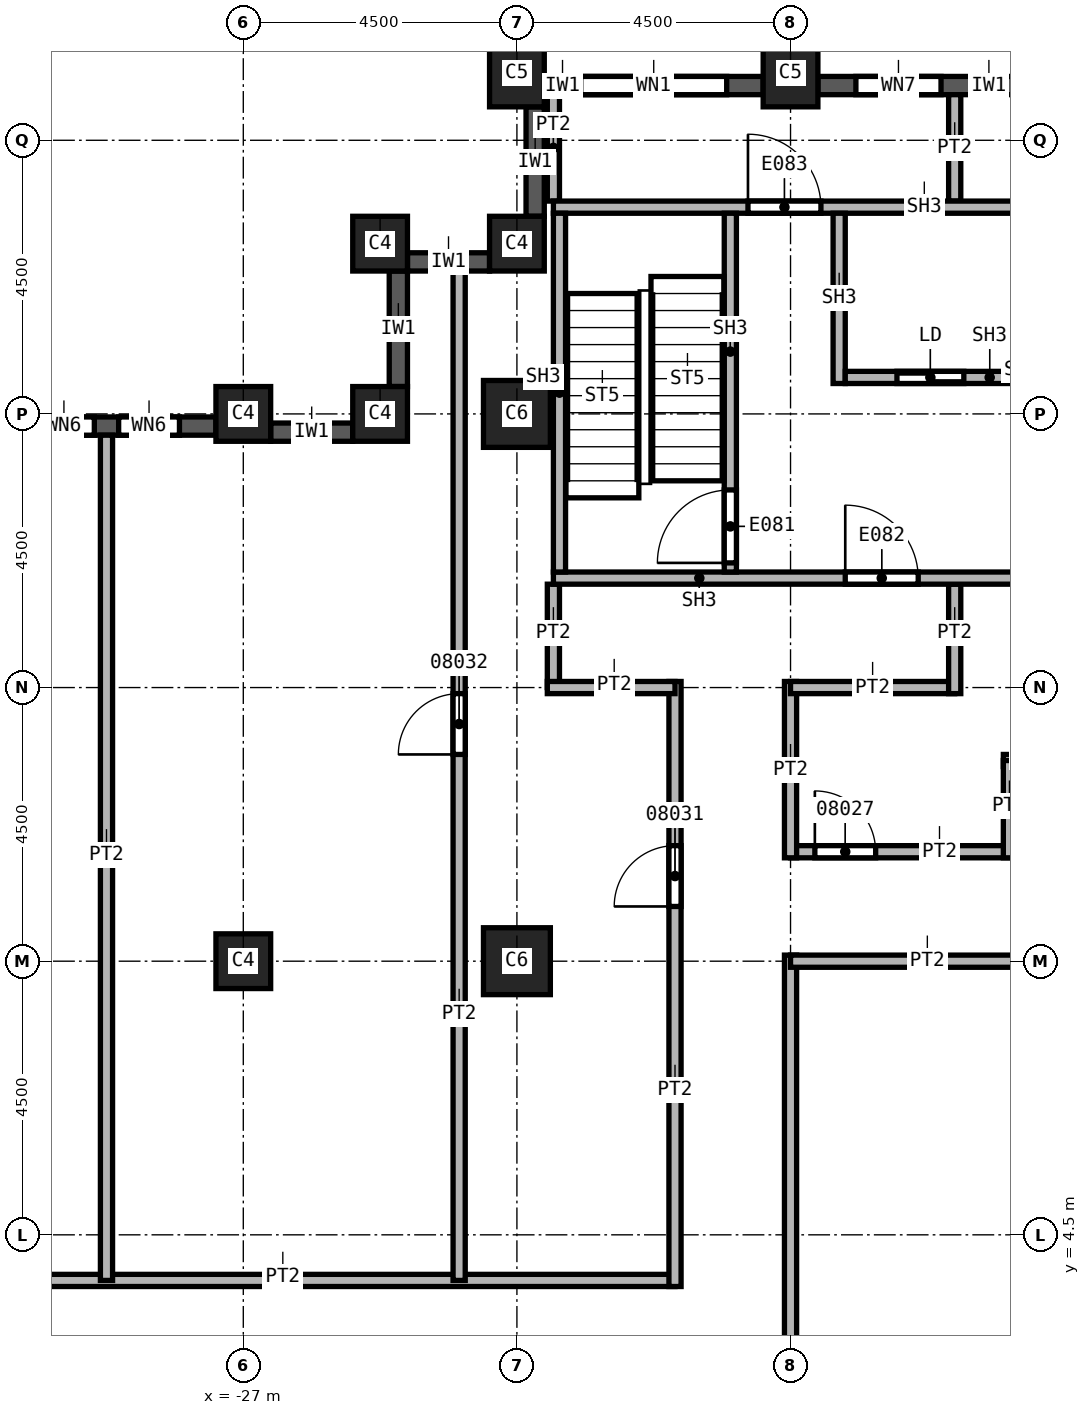
"""IFC4 building model, lengths in metres.
Left out: names, types, materials, properties, quantities, classifications, styles, units other than length and angle.
Written with IfcOpenShell. Run it as: python <this file> out.ifc"""

import sys

from ifc_helpers import new_model, si_unit, direction, frame, frame_2d, origin, origin_2d, place, context, subcontext, project, spatial, rectangle, extrude, element, fill, save


model = new_model("IFC4")
c1 = context("Model", 3, precision=1e-05, world=origin(), true_north=direction((0.0, 1.0)))
c2 = subcontext(c1, "Body", "Model", "MODEL_VIEW")
j1 = project(units=[si_unit("LENGTHUNIT", "METRE"), si_unit("PLANEANGLEUNIT", "RADIAN")], contexts=[c1])
p1 = place(None, origin())
s1 = spatial("IfcSite", under=j1, at=p1, CompositionType="ELEMENT")
p2 = place(p1, origin())
s2 = spatial("IfcBuilding", under=s1, at=p2, CompositionType="ELEMENT")
p3 = place(p2, frame((0.0, 0.0, 150.0)))
s3 = spatial("IfcBuildingStorey", under=s2, at=p3, CompositionType="ELEMENT", Elevation=150.0)
for number, where, z_axis, x_axis in (
    (1, (-22.5, 9.0, 0.0), (0.0, 0.0, 1.0), (1.0, 0.0, 0.0)),
    (2, (-22.5, 18.0, 0.0), (0.0, 0.0, 1.0), (1.0, 0.0, 0.0)),
):
    element("IfcColumn", number, at=place(p3, frame(where, z_axis=z_axis, x_axis=x_axis)), inside=s3, PredefinedType="COLUMN", context=c2, shape_type="SweptSolid", body=[
        extrude(rectangle(XDim=1.1, YDim=1.1, at=origin_2d()), origin(), (0.0, 0.0, 1.0), 3.7),
    ])
for number, where, z_axis, x_axis in (
    (3, (-18.0, 23.6, 0.0), (0.0, 0.0, 1.0), (1.0, 0.0, 0.0)),
    (4, (-22.5, 23.6, 0.0), (0.0, 0.0, 1.0), (1.0, 0.0, 0.0)),
):
    element("IfcColumn", number, at=place(p3, frame(where, z_axis=z_axis, x_axis=x_axis)), inside=s3, PredefinedType="COLUMN", context=c2, shape_type="SweptSolid", body=[
        extrude(rectangle(XDim=0.9, YDim=1.1, at=origin_2d()), origin(), (0.0, 0.0, 1.0), 3.7),
    ])
for number, where, z_axis, x_axis in (
    (5, (-27.0, 9.0, 0.0), (0.0, 0.0, 1.0), (1.0, 0.0, 0.0)),
    (6, (-27.0, 18.0, 0.0), (0.0, 0.0, 1.0), (1.0, 0.0, 0.0)),
    (7, (-22.5, 20.8, 0.0), (0.0, 0.0, 1.0), (1.0, 0.0, 0.0)),
    (8, (-24.75, 20.8, 0.0), (0.0, 0.0, 1.0), (1.0, 0.0, 0.0)),
    (9, (-24.75, 18.0, 0.0), (0.0, 0.0, 1.0), (1.0, 0.0, 0.0)),
):
    element("IfcColumn", number, at=place(p3, frame(where, z_axis=z_axis, x_axis=x_axis)), inside=s3, PredefinedType="COLUMN", context=c2, shape_type="SweptSolid", body=[
        extrude(rectangle(XDim=0.9, YDim=0.9, at=origin_2d()), origin(), (0.0, 0.0, 1.0), 3.7),
    ])
p4 = place(p3, frame((-22.2, 23.05, 0.0), z_axis=(0.0, 0.0, 1.0), x_axis=(0.0, -1.0, 0.0)))
e10 = element("IfcWall", 10, at=p4, inside=s3, PredefinedType="SOLIDWALL", context=c2, shape_type="SweptSolid", body=[
    extrude(rectangle(XDim=1.8, YDim=0.3, at=frame_2d((0.9, 0.0))), origin(), (0.0, 0.0, 1.0), 3.1),
])
p5 = place(p3, frame((-22.95, 20.5, 0.0), z_axis=(0.0, 0.0, 1.0), x_axis=(-1.0, 0.0, 0.0)))
e11 = element("IfcWall", 11, at=p5, inside=s3, PredefinedType="SOLIDWALL", context=c2, shape_type="SweptSolid", body=[
    extrude(rectangle(XDim=1.35, YDim=0.3, at=frame_2d((0.675, 0.0))), origin(), (0.0, 0.0, 1.0), 3.1),
])
p6 = place(p3, frame((-24.45, 20.35, 0.0), z_axis=(0.0, 0.0, 1.0), x_axis=(0.0, -1.0, 0.0)))
e12 = element("IfcWall", 12, at=p6, inside=s3, PredefinedType="SOLIDWALL", context=c2, shape_type="SweptSolid", body=[
    extrude(rectangle(XDim=1.9, YDim=0.3, at=frame_2d((0.95, 0.0))), origin(), (0.0, 0.0, 1.0), 3.1),
])
p7 = place(p3, frame((-25.2, 17.7, 0.0), z_axis=(0.0, 0.0, 1.0), x_axis=(-1.0, 0.0, 0.0)))
e13 = element("IfcWall", 13, at=p7, inside=s3, PredefinedType="SOLIDWALL", context=c2, shape_type="SweptSolid", body=[
    extrude(rectangle(XDim=1.35, YDim=0.3, at=frame_2d((0.675, 0.0))), origin(), (0.0, 0.0, 1.0), 3.1),
])
p8 = place(p3, frame((-27.45, 17.8, 0.0), z_axis=(0.0, 0.0, 1.0), x_axis=(-1.0, 0.0, 0.0)))
e14 = element("IfcWall", 14, at=p8, inside=s3, PredefinedType="SOLIDWALL", context=c2, shape_type="SweptSolid", body=[
    extrude(rectangle(XDim=3.6, YDim=0.3, at=frame_2d((1.8, 0.0))), origin(), (0.0, 0.0, 1.0), 3.1),
])
p9 = place(p8, frame((0.6, 0.0, 0.8)))
e15 = element("IfcOpeningElement", 15, at=p9, cuts=e14, PredefinedType="OPENING", context=c2, shape_type="SweptSolid", body=[
    extrude(rectangle(XDim=1.0, YDim=1.95, at=frame_2d((0.5, 0.975))), frame((0.0, 0.15, 0.0), z_axis=(0.0, -1.0, 0.0), x_axis=(1.0, 0.0, 0.0)), (0.0, 0.0, 1.0), 0.3),
])
p10 = place(p8, frame((2.0, 0.0, 0.8)))
e16 = element("IfcOpeningElement", 16, at=p10, cuts=e14, PredefinedType="OPENING", context=c2, shape_type="SweptSolid", body=[
    extrude(rectangle(XDim=1.0, YDim=1.95, at=frame_2d((0.5, 0.975))), frame((0.0, 0.15, 0.0), z_axis=(0.0, -1.0, 0.0), x_axis=(1.0, 0.0, 0.0)), (0.0, 0.0, 1.0), 0.3),
])
p11 = place(p3, frame((-13.95, 23.4, 0.0), z_axis=(0.0, 0.0, 1.0), x_axis=(-1.0, 0.0, 0.0)))
e17 = element("IfcWall", 17, at=p11, inside=s3, PredefinedType="SOLIDWALL", context=c2, shape_type="SweptSolid", body=[
    extrude(rectangle(XDim=3.6, YDim=0.3, at=frame_2d((1.8, 0.0))), origin(), (0.0, 0.0, 1.0), 3.1),
])
p12 = place(p11, frame((1.575, 0.0, 0.8)))
e18 = element("IfcOpeningElement", 18, at=p12, cuts=e17, PredefinedType="OPENING", context=c2, shape_type="SweptSolid", body=[
    extrude(rectangle(XDim=1.4, YDim=1.95, at=frame_2d((0.7, 0.975))), frame((0.0, 0.15, 0.0), z_axis=(0.0, -1.0, 0.0), x_axis=(1.0, 0.0, 0.0)), (0.0, 0.0, 1.0), 0.3),
])
p13 = place(p3, frame((-18.45, 23.4, 0.0), z_axis=(0.0, 0.0, 1.0), x_axis=(-1.0, 0.0, 0.0)))
e19 = element("IfcWall", 19, at=p13, inside=s3, PredefinedType="SOLIDWALL", context=c2, shape_type="SweptSolid", body=[
    extrude(rectangle(XDim=3.6, YDim=0.3, at=frame_2d((1.8, 0.0))), origin(), (0.0, 0.0, 1.0), 3.1),
])
p14 = place(p13, frame((0.6, 0.0, 0.8)))
e20 = element("IfcOpeningElement", 20, at=p14, cuts=e19, PredefinedType="OPENING", context=c2, shape_type="SweptSolid", body=[
    extrude(rectangle(XDim=2.4, YDim=1.95, at=frame_2d((1.2, 0.975))), frame((0.0, 0.15, 0.0), z_axis=(0.0, -1.0, 0.0), x_axis=(1.0, 0.0, 0.0)), (0.0, 0.0, 1.0), 0.3),
])
p15 = place(p3, frame((-33.85, 3.75, 0.0), z_axis=(0.0, 0.0, 1.0), x_axis=(1.0, 0.0, 0.0)))
e21 = element("IfcWall", 21, at=p15, inside=s3, PredefinedType="PARTITIONING", context=c2, shape_type="SweptSolid", body=[
    extrude(rectangle(XDim=13.95, YDim=0.2, at=frame_2d((6.975, 0.0))), origin(), (0.0, 0.0, 1.0), 3.7),
])
p16 = place(p3, frame((-29.25, 3.75, 0.0), z_axis=(0.0, 0.0, 1.0), x_axis=(0.0, 1.0, 0.0)))
e22 = element("IfcWall", 22, at=p16, inside=s3, PredefinedType="PARTITIONING", context=c2, shape_type="SweptSolid", body=[
    extrude(rectangle(XDim=13.9, YDim=0.2, at=frame_2d((6.95, 0.0))), origin(), (0.0, 0.0, 1.0), 3.7),
])
p17 = place(p3, frame((-23.45, 3.75, 0.0), z_axis=(0.0, 0.0, 1.0), x_axis=(0.0, 1.0, 0.0)))
e23 = element("IfcWall", 23, at=p17, inside=s3, PredefinedType="PARTITIONING", context=c2, shape_type="SweptSolid", body=[
    extrude(rectangle(XDim=16.6, YDim=0.2, at=frame_2d((8.3, 0.0))), origin(), (0.0, 0.0, 1.0), 3.7),
])
p18 = place(p17, frame((8.65, 0.0, 0.0)))
e24 = element("IfcOpeningElement", 24, at=p18, cuts=e23, PredefinedType="OPENING", context=c2, shape_type="SweptSolid", body=[
    extrude(rectangle(XDim=1.0, YDim=2.1, at=frame_2d((0.5, 1.05))), frame((0.0, 0.1, 0.0), z_axis=(0.0, -1.0, 0.0), x_axis=(1.0, 0.0, 0.0)), (0.0, 0.0, 1.0), 0.2),
])
p19 = place(p3, frame((-21.9, 13.5, 0.0), z_axis=(0.0, 0.0, 1.0), x_axis=(0.0, 1.0, 0.0)))
e25 = element("IfcWall", 25, at=p19, inside=s3, PredefinedType="PARTITIONING", context=c2, shape_type="SweptSolid", body=[
    extrude(rectangle(XDim=1.7, YDim=0.2, at=frame_2d((0.85, 0.0))), origin(), (0.0, 0.0, 1.0), 3.7),
])
p20 = place(p3, frame((-21.9, 21.5, 0.0), z_axis=(0.0, 0.0, 1.0), x_axis=(0.0, 1.0, 0.0)))
e26 = element("IfcWall", 26, at=p20, inside=s3, PredefinedType="PARTITIONING", context=c2, shape_type="SweptSolid", body=[
    extrude(rectangle(XDim=1.75, YDim=0.2, at=frame_2d((0.875, 0.0))), origin(), (0.0, 0.0, 1.0), 3.7),
])
p21 = place(p3, frame((-19.9, 3.65, 0.0), z_axis=(0.0, 0.0, 1.0), x_axis=(0.0, 1.0, 0.0)))
e27 = element("IfcWall", 27, at=p21, inside=s3, PredefinedType="PARTITIONING", context=c2, shape_type="SweptSolid", body=[
    extrude(rectangle(XDim=9.95, YDim=0.2, at=frame_2d((4.975, 0.0))), origin(), (0.0, 0.0, 1.0), 3.7),
])
p22 = place(p21, frame((6.25, 0.0, 0.0)))
e28 = element("IfcOpeningElement", 28, at=p22, cuts=e27, PredefinedType="OPENING", context=c2, shape_type="SweptSolid", body=[
    extrude(rectangle(XDim=1.0, YDim=2.1, at=frame_2d((0.5, 1.05))), frame((0.0, 0.1, 0.0), z_axis=(0.0, -1.0, 0.0), x_axis=(1.0, 0.0, 0.0)), (0.0, 0.0, 1.0), 0.2),
])
p23 = place(p3, frame((-19.9, 13.5, 0.0), z_axis=(0.0, 0.0, 1.0), x_axis=(-1.0, 0.0, 0.0)))
e29 = element("IfcWall", 29, at=p23, inside=s3, PredefinedType="PARTITIONING", context=c2, shape_type="SweptSolid", body=[
    extrude(rectangle(XDim=2.1, YDim=0.2, at=frame_2d((1.05, 0.0))), origin(), (0.0, 0.0, 1.0), 3.7),
])
p24 = place(p3, frame((-18.0, 9.1, 0.0), z_axis=(0.0, 0.0, 1.0), x_axis=(0.0, -1.0, 0.0)))
e30 = element("IfcWall", 30, at=p24, inside=s3, PredefinedType="PARTITIONING", context=c2, shape_type="SweptSolid", body=[
    extrude(rectangle(XDim=18.2, YDim=0.2, at=frame_2d((9.1, 0.0))), origin(), (0.0, 0.0, 1.0), 3.7),
])
p25 = place(p24, frame((16.9, 0.0, 0.0)))
e31 = element("IfcOpeningElement", 31, at=p25, cuts=e30, PredefinedType="OPENING", context=c2, shape_type="SweptSolid", body=[
    extrude(rectangle(XDim=1.0, YDim=2.1, at=frame_2d((0.5, 1.05))), frame((0.0, 0.1, 0.0), z_axis=(0.0, -1.0, 0.0), x_axis=(1.0, 0.0, 0.0)), (0.0, 0.0, 1.0), 0.2),
])
p26 = place(p24, frame((7.0, 0.0, 0.0)))
e32 = element("IfcOpeningElement", 32, at=p26, cuts=e30, PredefinedType="OPENING", context=c2, shape_type="SweptSolid", body=[
    extrude(rectangle(XDim=1.0, YDim=2.1, at=frame_2d((0.5, 1.05))), frame((0.0, 0.1, 0.0), z_axis=(0.0, -1.0, 0.0), x_axis=(1.0, 0.0, 0.0)), (0.0, 0.0, 1.0), 0.2),
])
p27 = place(p3, frame((-18.0, 10.8, 0.0), z_axis=(0.0, 0.0, 1.0), x_axis=(1.0, 0.0, 0.0)))
e33 = element("IfcWall", 33, at=p27, inside=s3, PredefinedType="PARTITIONING", context=c2, shape_type="SweptSolid", body=[
    extrude(rectangle(XDim=3.6, YDim=0.2, at=frame_2d((1.8, 0.0))), origin(), (0.0, 0.0, 1.0), 3.7),
])
p28 = place(p27, frame((0.4, 0.0, 0.0)))
e34 = element("IfcOpeningElement", 34, at=p28, cuts=e33, PredefinedType="OPENING", context=c2, shape_type="SweptSolid", body=[
    extrude(rectangle(XDim=1.0, YDim=2.1, at=frame_2d((0.5, 1.05))), frame((0.0, 0.1, 0.0), z_axis=(0.0, -1.0, 0.0), x_axis=(1.0, 0.0, 0.0)), (0.0, 0.0, 1.0), 0.2),
])
p29 = place(p3, frame((-18.0, 13.6, 0.0), z_axis=(0.0, 0.0, 1.0), x_axis=(0.0, -1.0, 0.0)))
e35 = element("IfcWall", 35, at=p29, inside=s3, PredefinedType="PARTITIONING", context=c2, shape_type="SweptSolid", body=[
    extrude(rectangle(XDim=2.9, YDim=0.2, at=frame_2d((1.45, 0.0))), origin(), (0.0, 0.0, 1.0), 3.7),
])
p30 = place(p3, frame((-15.3, 13.5, 0.0), z_axis=(0.0, 0.0, 1.0), x_axis=(-1.0, 0.0, 0.0)))
e36 = element("IfcWall", 36, at=p30, inside=s3, PredefinedType="PARTITIONING", context=c2, shape_type="SweptSolid", body=[
    extrude(rectangle(XDim=2.7, YDim=0.2, at=frame_2d((1.35, 0.0))), origin(), (0.0, 0.0, 1.0), 3.7),
])
p31 = place(p3, frame((-15.3, 15.2, 0.0), z_axis=(0.0, 0.0, 1.0), x_axis=(0.0, -1.0, 0.0)))
e37 = element("IfcWall", 37, at=p31, inside=s3, PredefinedType="PARTITIONING", context=c2, shape_type="SweptSolid", body=[
    extrude(rectangle(XDim=1.8, YDim=0.2, at=frame_2d((0.9, 0.0))), origin(), (0.0, 0.0, 1.0), 3.7),
])
p32 = place(p3, frame((-15.3, 23.25, 0.0), z_axis=(0.0, 0.0, 1.0), x_axis=(0.0, -1.0, 0.0)))
e38 = element("IfcWall", 38, at=p32, inside=s3, PredefinedType="PARTITIONING", context=c2, shape_type="SweptSolid", body=[
    extrude(rectangle(XDim=1.75, YDim=0.2, at=frame_2d((0.875, 0.0))), origin(), (0.0, 0.0, 1.0), 3.7),
])
p33 = place(p3, frame((-14.5, 12.3, 0.0), z_axis=(0.0, 0.0, 1.0), x_axis=(1.0, 0.0, 0.0)))
e39 = element("IfcWall", 39, at=p33, inside=s3, PredefinedType="PARTITIONING", context=c2, shape_type="SweptSolid", body=[
    extrude(rectangle(XDim=1.125, YDim=0.2, at=frame_2d((0.562, 0.0))), origin(), (0.0, 0.0, 1.0), 3.7),
])
p34 = place(p3, frame((-13.5, 9.0, 0.0), z_axis=(0.0, 0.0, 1.0), x_axis=(-1.0, 0.0, 0.0)))
e40 = element("IfcWall", 40, at=p34, inside=s3, PredefinedType="PARTITIONING", context=c2, shape_type="SweptSolid", body=[
    extrude(rectangle(XDim=4.5, YDim=0.2, at=frame_2d((2.25, 0.0))), origin(), (0.0, 0.0, 1.0), 3.7),
])
p35 = place(p3, frame((-14.4, 10.7, 0.0), z_axis=(0.0, 0.0, 1.0), x_axis=(0.0, 1.0, 0.0)))
e41 = element("IfcWall", 41, at=p35, inside=s3, PredefinedType="PARTITIONING", context=c2, shape_type="SweptSolid", body=[
    extrude(rectangle(XDim=1.6, YDim=0.2, at=frame_2d((0.8, 0.0))), origin(), (0.0, 0.0, 1.0), 3.7),
])
p36 = place(p3, frame((-21.9, 15.3, 0.0), z_axis=(0.0, 0.0, 1.0), x_axis=(1.0, 0.0, 0.0)))
e42 = element("IfcWall", 42, at=p36, inside=s3, PredefinedType="SOLIDWALL", context=c2, shape_type="SweptSolid", body=[
    extrude(rectangle(XDim=8.275, YDim=0.2, at=frame_2d((4.137, 0.0))), origin(), (0.0, 0.0, 1.0), 3.7),
])
p37 = place(p36, frame((4.8, 0.0, 0.0)))
e43 = element("IfcOpeningElement", 43, at=p37, cuts=e42, PredefinedType="OPENING", context=c2, shape_type="SweptSolid", body=[
    extrude(rectangle(XDim=1.2, YDim=2.1, at=frame_2d((0.6, 1.05))), frame((0.0, 0.1, 0.0), z_axis=(0.0, -1.0, 0.0), x_axis=(1.0, 0.0, 0.0)), (0.0, 0.0, 1.0), 0.2),
])
p38 = place(p3, frame((-21.9, 21.4, 0.0), z_axis=(0.0, 0.0, 1.0), x_axis=(1.0, 0.0, 0.0)))
e44 = element("IfcWall", 44, at=p38, inside=s3, PredefinedType="SOLIDWALL", context=c2, shape_type="SweptSolid", body=[
    extrude(rectangle(XDim=7.8, YDim=0.2, at=frame_2d((3.9, 0.0))), origin(), (0.0, 0.0, 1.0), 3.7),
])
p39 = place(p38, frame((3.2, 0.0, 0.0)))
e45 = element("IfcOpeningElement", 45, at=p39, cuts=e44, PredefinedType="OPENING", context=c2, shape_type="SweptSolid", body=[
    extrude(rectangle(XDim=1.2, YDim=2.1, at=frame_2d((0.6, 1.05))), frame((0.0, 0.1, 0.0), z_axis=(0.0, -1.0, 0.0), x_axis=(1.0, 0.0, 0.0)), (0.0, 0.0, 1.0), 0.2),
])
p40 = place(p3, frame((-21.8, 15.4, 0.0), z_axis=(0.0, 0.0, 1.0), x_axis=(0.0, 1.0, 0.0)))
e46 = element("IfcWall", 46, at=p40, inside=s3, PredefinedType="SOLIDWALL", context=c2, shape_type="SweptSolid", body=[
    extrude(rectangle(XDim=5.9, YDim=0.2, at=frame_2d((2.95, 0.0))), origin(), (0.0, 0.0, 1.0), 3.7),
])
p41 = place(p3, frame((-18.99, 15.4, 0.0), z_axis=(0.0, 0.0, 1.0), x_axis=(0.0, 1.0, 0.0)))
e47 = element("IfcWall", 47, at=p41, inside=s3, PredefinedType="SOLIDWALL", context=c2, shape_type="SweptSolid", body=[
    extrude(rectangle(XDim=5.9, YDim=0.2, at=frame_2d((2.95, 0.0))), origin(), (0.0, 0.0, 1.0), 3.7),
])
p42 = place(p41, frame((0.15, 0.0, 0.0)))
e48 = element("IfcOpeningElement", 48, at=p42, cuts=e47, PredefinedType="OPENING", context=c2, shape_type="SweptSolid", body=[
    extrude(rectangle(XDim=1.2, YDim=2.1, at=frame_2d((0.6, 1.05))), frame((0.0, 0.1, 0.0), z_axis=(0.0, -1.0, 0.0), x_axis=(1.0, 0.0, 0.0)), (0.0, 0.0, 1.0), 0.2),
])
p43 = place(p3, frame((-17.2, 18.5, 0.0), z_axis=(0.0, 0.0, 1.0), x_axis=(0.0, 1.0, 0.0)))
e49 = element("IfcWall", 49, at=p43, inside=s3, PredefinedType="SOLIDWALL", context=c2, shape_type="SweptSolid", body=[
    extrude(rectangle(XDim=2.8, YDim=0.2, at=frame_2d((1.4, 0.0))), origin(), (0.0, 0.0, 1.0), 3.7),
])
p44 = place(p3, frame((-17.1, 18.6, 0.0), z_axis=(0.0, 0.0, 1.0), x_axis=(1.0, 0.0, 0.0)))
e50 = element("IfcWall", 50, at=p44, inside=s3, PredefinedType="SOLIDWALL", context=c2, shape_type="SweptSolid", body=[
    extrude(rectangle(XDim=2.8, YDim=0.2, at=frame_2d((1.4, 0.0))), origin(), (0.0, 0.0, 1.0), 3.7),
])
p45 = place(p44, frame((0.85, 0.0, 0.0)))
e51 = element("IfcOpeningElement", 51, at=p45, cuts=e50, PredefinedType="OPENING", context=c2, shape_type="SweptSolid", body=[
    extrude(rectangle(XDim=1.1, YDim=2.1, at=frame_2d((0.55, 1.05))), frame((0.0, 0.1, 0.0), z_axis=(0.0, -1.0, 0.0), x_axis=(1.0, 0.0, 0.0)), (0.0, 0.0, 1.0), 0.2),
])
p46 = place(p14, origin())
e52 = element("IfcWindow", 52, at=p46, inside=s3, PartitioningType="SINGLE_PANEL", PredefinedType="WINDOW", context=c2, shape_type="SweptSolid", body=[
    extrude(rectangle(XDim=2.4, YDim=1.95, at=frame_2d((1.2, 0.975))), frame((0.0, 0.03, 0.0), z_axis=(0.0, -1.0, 0.0), x_axis=(1.0, 0.0, 0.0)), (0.0, 0.0, 1.0), 0.06),
])
fill(e20, e52)
p47 = place(p28, origin())
e53 = element("IfcDoor", 53, at=p47, inside=s3, OperationType="SINGLE_SWING_RIGHT", PredefinedType="DOOR", context=c2, shape_type="SweptSolid", body=[
    extrude(rectangle(XDim=1.0, YDim=2.1, at=frame_2d((0.5, 1.05))), frame((0.0, 0.025, 0.0), z_axis=(0.0, -1.0, 0.0), x_axis=(1.0, 0.0, 0.0)), (0.0, 0.0, 1.0), 0.05),
])
fill(e34, e53)
p48 = place(p22, origin())
e54 = element("IfcDoor", 54, at=p48, inside=s3, OperationType="SINGLE_SWING_RIGHT", PredefinedType="DOOR", context=c2, shape_type="SweptSolid", body=[
    extrude(rectangle(XDim=1.0, YDim=2.1, at=frame_2d((0.5, 1.05))), frame((0.0, 0.025, 0.0), z_axis=(0.0, -1.0, 0.0), x_axis=(1.0, 0.0, 0.0)), (0.0, 0.0, 1.0), 0.05),
])
fill(e28, e54)
p49 = place(p18, origin())
e55 = element("IfcDoor", 55, at=p49, inside=s3, OperationType="SINGLE_SWING_LEFT", PredefinedType="DOOR", context=c2, shape_type="SweptSolid", body=[
    extrude(rectangle(XDim=1.0, YDim=2.1, at=frame_2d((0.5, 1.05))), frame((0.0, 0.025, 0.0), z_axis=(0.0, -1.0, 0.0), x_axis=(1.0, 0.0, 0.0)), (0.0, 0.0, 1.0), 0.05),
])
fill(e24, e55)
p50 = place(p42, origin())
e56 = element("IfcDoor", 56, at=p50, inside=s3, OperationType="SINGLE_SWING_LEFT", PredefinedType="DOOR", context=c2, shape_type="SweptSolid", body=[
    extrude(rectangle(XDim=1.2, YDim=2.1, at=frame_2d((0.6, 1.05))), frame((0.0, 0.025, 0.0), z_axis=(0.0, -1.0, 0.0), x_axis=(1.0, 0.0, 0.0)), (0.0, 0.0, 1.0), 0.05),
])
fill(e48, e56)
p51 = place(p45, origin())
e57 = element("IfcDoor", 57, at=p51, inside=s3, OperationType="SLIDING_TO_LEFT", PredefinedType="DOOR", context=c2, shape_type="SweptSolid", body=[
    extrude(rectangle(XDim=1.1, YDim=2.1, at=frame_2d((0.55, 1.05))), frame((0.0, 0.025, 0.0), z_axis=(0.0, -1.0, 0.0), x_axis=(1.0, 0.0, 0.0)), (0.0, 0.0, 1.0), 0.05),
])
fill(e51, e57)
p52 = place(p37, origin())
e58 = element("IfcDoor", 58, at=p52, inside=s3, OperationType="SINGLE_SWING_RIGHT", PredefinedType="DOOR", context=c2, shape_type="SweptSolid", body=[
    extrude(rectangle(XDim=1.2, YDim=2.1, at=frame_2d((0.6, 1.05))), frame((0.0, 0.025, 0.0), z_axis=(0.0, -1.0, 0.0), x_axis=(1.0, 0.0, 0.0)), (0.0, 0.0, 1.0), 0.05),
])
fill(e43, e58)
p53 = place(p39, origin())
e59 = element("IfcDoor", 59, at=p53, inside=s3, OperationType="SINGLE_SWING_LEFT", PredefinedType="DOOR", context=c2, shape_type="SweptSolid", body=[
    extrude(rectangle(XDim=1.2, YDim=2.1, at=frame_2d((0.6, 1.05))), frame((0.0, 0.025, 0.0), z_axis=(0.0, -1.0, 0.0), x_axis=(1.0, 0.0, 0.0)), (0.0, 0.0, 1.0), 0.05),
])
fill(e45, e59)
p54 = place(p9, origin())
e60 = element("IfcWindow", 60, at=p54, inside=s3, PartitioningType="SINGLE_PANEL", PredefinedType="WINDOW", context=c2, shape_type="SweptSolid", body=[
    extrude(rectangle(XDim=1.0, YDim=1.95, at=frame_2d((0.5, 0.975))), frame((0.0, 0.03, 0.0), z_axis=(0.0, -1.0, 0.0), x_axis=(1.0, 0.0, 0.0)), (0.0, 0.0, 1.0), 0.06),
])
fill(e15, e60)
p55 = place(p10, origin())
e61 = element("IfcWindow", 61, at=p55, inside=s3, PartitioningType="SINGLE_PANEL", PredefinedType="WINDOW", context=c2, shape_type="SweptSolid", body=[
    extrude(rectangle(XDim=1.0, YDim=1.95, at=frame_2d((0.5, 0.975))), frame((0.0, 0.03, 0.0), z_axis=(0.0, -1.0, 0.0), x_axis=(1.0, 0.0, 0.0)), (0.0, 0.0, 1.0), 0.06),
])
fill(e16, e61)
p56 = place(p12, origin())
e62 = element("IfcWindow", 62, at=p56, inside=s3, PartitioningType="SINGLE_PANEL", PredefinedType="WINDOW", context=c2, shape_type="SweptSolid", body=[
    extrude(rectangle(XDim=1.4, YDim=1.95, at=frame_2d((0.7, 0.975))), frame((0.0, 0.03, 0.0), z_axis=(0.0, -1.0, 0.0), x_axis=(1.0, 0.0, 0.0)), (0.0, 0.0, 1.0), 0.06),
])
fill(e18, e62)
save(model, sys.argv[1])
